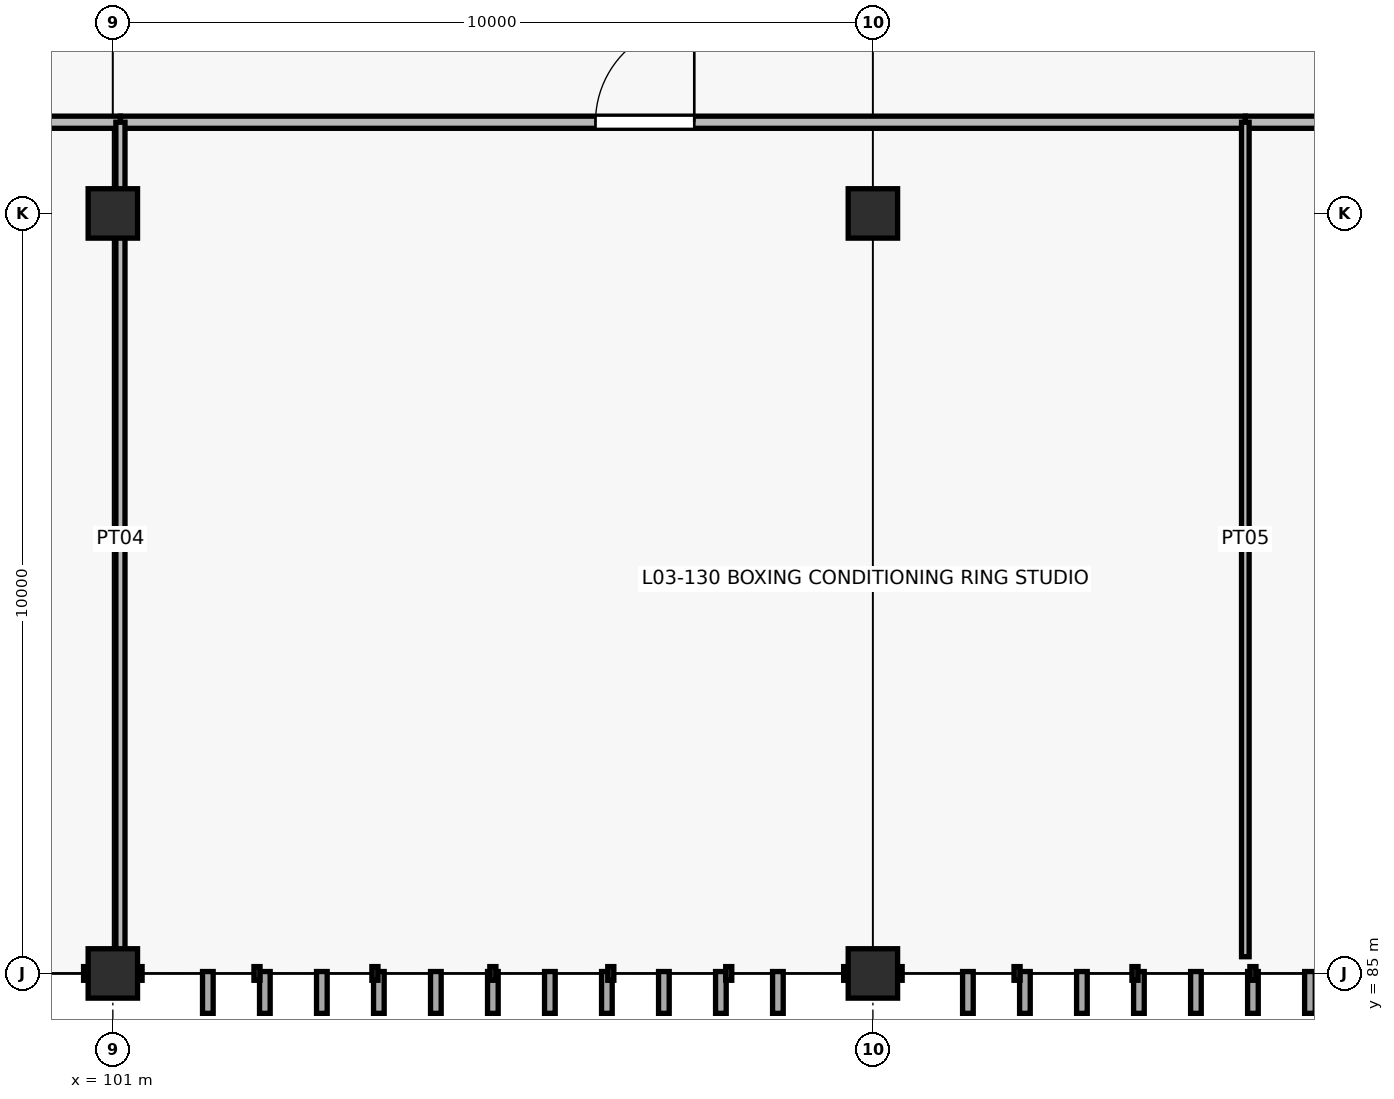
"""IFC4 building model, lengths in metres.
Left out: names, types, materials, properties, quantities, classifications, styles, units other than length and angle.
Written with IfcOpenShell. Run it as: python <this file> out.ifc"""

import sys

from ifc_helpers import new_model, si_unit, direction, frame, frame_2d, origin, origin_2d, place, context, subcontext, project, spatial, rectangle, extrude, element, fill, save


model = new_model("IFC4")
c1 = context("Model", 3, precision=1e-05, world=origin(), true_north=direction((0.0, 1.0)))
c2 = subcontext(c1, "Body", "Model", "MODEL_VIEW")
j1 = project(units=[si_unit("LENGTHUNIT", "METRE"), si_unit("PLANEANGLEUNIT", "RADIAN")], contexts=[c1])
p1 = place(None, origin())
s1 = spatial("IfcSite", under=j1, at=p1, CompositionType="ELEMENT")
p2 = place(p1, origin())
s2 = spatial("IfcBuilding", under=s1, at=p2, CompositionType="ELEMENT")
p3 = place(p2, frame((0.0, 0.0, 13.2)))
s3 = spatial("IfcBuildingStorey", under=s2, at=p3, CompositionType="ELEMENT", Elevation=13.2)
for number, where, z_axis, x_axis in (
    (1, (101.0, 85.0, 0.0), (0.0, 0.0, 1.0), (1.0, 0.0, 0.0)),
    (2, (101.0, 95.0, 0.0), (0.0, 0.0, 1.0), (1.0, 0.0, 0.0)),
    (3, (111.0, 85.0, 0.0), (0.0, 0.0, 1.0), (1.0, 0.0, 0.0)),
    (4, (111.0, 95.0, 0.0), (0.0, 0.0, 1.0), (1.0, 0.0, 0.0)),
):
    element("IfcColumn", number, at=place(p3, frame(where, z_axis=z_axis, x_axis=x_axis)), inside=s3, PredefinedType="COLUMN", context=c2, shape_type="SweptSolid", body=[
        extrude(rectangle(XDim=0.65, YDim=0.65, at=origin_2d()), origin(), (0.0, 0.0, 1.0), 4.2),
    ])
p4 = place(p3, frame((79.1, 96.2, 0.0), z_axis=(0.0, 0.0, 1.0), x_axis=(1.0, 0.0, 0.0)))
e5 = element("IfcWall", 5, at=p4, inside=s3, PredefinedType="PARTITIONING", context=c2, shape_type="SweptSolid", body=[
    extrude(rectangle(XDim=22.0, YDim=0.16, at=frame_2d((11.0, 0.0))), origin(), (0.0, 0.0, 1.0), 3.005),
])
p5 = place(p4, frame((7.95, 0.0, 0.0)))
e6 = element("IfcOpeningElement", 6, at=p5, cuts=e5, PredefinedType="OPENING", context=c2, shape_type="SweptSolid", body=[
    extrude(rectangle(XDim=1.7, YDim=2.25, at=frame_2d((0.85, 1.125))), frame((0.0, 0.09, 0.0), z_axis=(0.0, -1.0, 0.0), x_axis=(1.0, 0.0, 0.0)), (0.0, 0.0, 1.0), 0.18),
])
p6 = place(p3, frame((101.1, 96.2, 0.0), z_axis=(0.0, 0.0, 1.0), x_axis=(1.0, 0.0, 0.0)))
e7 = element("IfcWall", 7, at=p6, inside=s3, PredefinedType="PARTITIONING", context=c2, shape_type="SweptSolid", body=[
    extrude(rectangle(XDim=14.8, YDim=0.16, at=frame_2d((7.4, 0.0))), origin(), (0.0, 0.0, 1.0), 3.005),
])
p7 = place(p6, frame((6.25, 0.0, 0.0)))
e8 = element("IfcOpeningElement", 8, at=p7, cuts=e7, PredefinedType="OPENING", context=c2, shape_type="SweptSolid", body=[
    extrude(rectangle(XDim=1.3, YDim=2.2, at=frame_2d((0.65, 1.1))), frame((0.0, 0.09, 0.0), z_axis=(0.0, -1.0, 0.0), x_axis=(1.0, 0.0, 0.0)), (0.0, 0.0, 1.0), 0.18),
])
p8 = place(p3, frame((101.1, 85.22, 0.0), z_axis=(0.0, 0.0, 1.0), x_axis=(0.0, 1.0, 0.0)))
e9 = element("IfcWall", 9, at=p8, inside=s3, PredefinedType="PARTITIONING", context=c2, shape_type="SweptSolid", body=[
    extrude(rectangle(XDim=10.98, YDim=0.12, at=frame_2d((5.49, 0.0))), origin(), (0.0, 0.0, 1.0), 3.005),
])
p9 = place(p3, frame((115.9, 96.2, 0.0), z_axis=(0.0, 0.0, 1.0), x_axis=(1.0, 0.0, 0.0)))
e10 = element("IfcWall", 10, at=p9, inside=s3, PredefinedType="PARTITIONING", context=c2, shape_type="SweptSolid", body=[
    extrude(rectangle(XDim=5.2, YDim=0.16, at=frame_2d((2.6, 0.0))), origin(), (0.0, 0.0, 1.0), 3.005),
])
p10 = place(p9, frame((2.1, 0.0, 0.0)))
e11 = element("IfcOpeningElement", 11, at=p10, cuts=e10, PredefinedType="OPENING", context=c2, shape_type="SweptSolid", body=[
    extrude(rectangle(XDim=0.98, YDim=2.1, at=frame_2d((0.49, 1.05))), frame((0.0, 0.09, 0.0), z_axis=(0.0, -1.0, 0.0), x_axis=(1.0, 0.0, 0.0)), (0.0, 0.0, 1.0), 0.18),
])
p11 = place(p3, frame((115.9, 85.22, 0.0), z_axis=(0.0, 0.0, 1.0), x_axis=(0.0, 1.0, 0.0)))
e12 = element("IfcWall", 12, at=p11, inside=s3, PredefinedType="PARTITIONING", context=c2, shape_type="SweptSolid", body=[
    extrude(rectangle(XDim=10.98, YDim=0.1, at=frame_2d((5.49, 0.0))), origin(), (0.0, 0.0, 1.0), 3.005),
])
p12 = place(p7, origin())
e13 = element("IfcDoor", 13, at=p12, inside=s3, OperationType="SINGLE_SWING_RIGHT", PredefinedType="DOOR", context=c2, shape_type="SweptSolid", body=[
    extrude(rectangle(XDim=1.3, YDim=2.2, at=frame_2d((0.65, 1.1))), frame((0.0, 0.025, 0.0), z_axis=(0.0, -1.0, 0.0), x_axis=(1.0, 0.0, 0.0)), (0.0, 0.0, 1.0), 0.05),
])
fill(e8, e13)
save(model, sys.argv[1])
